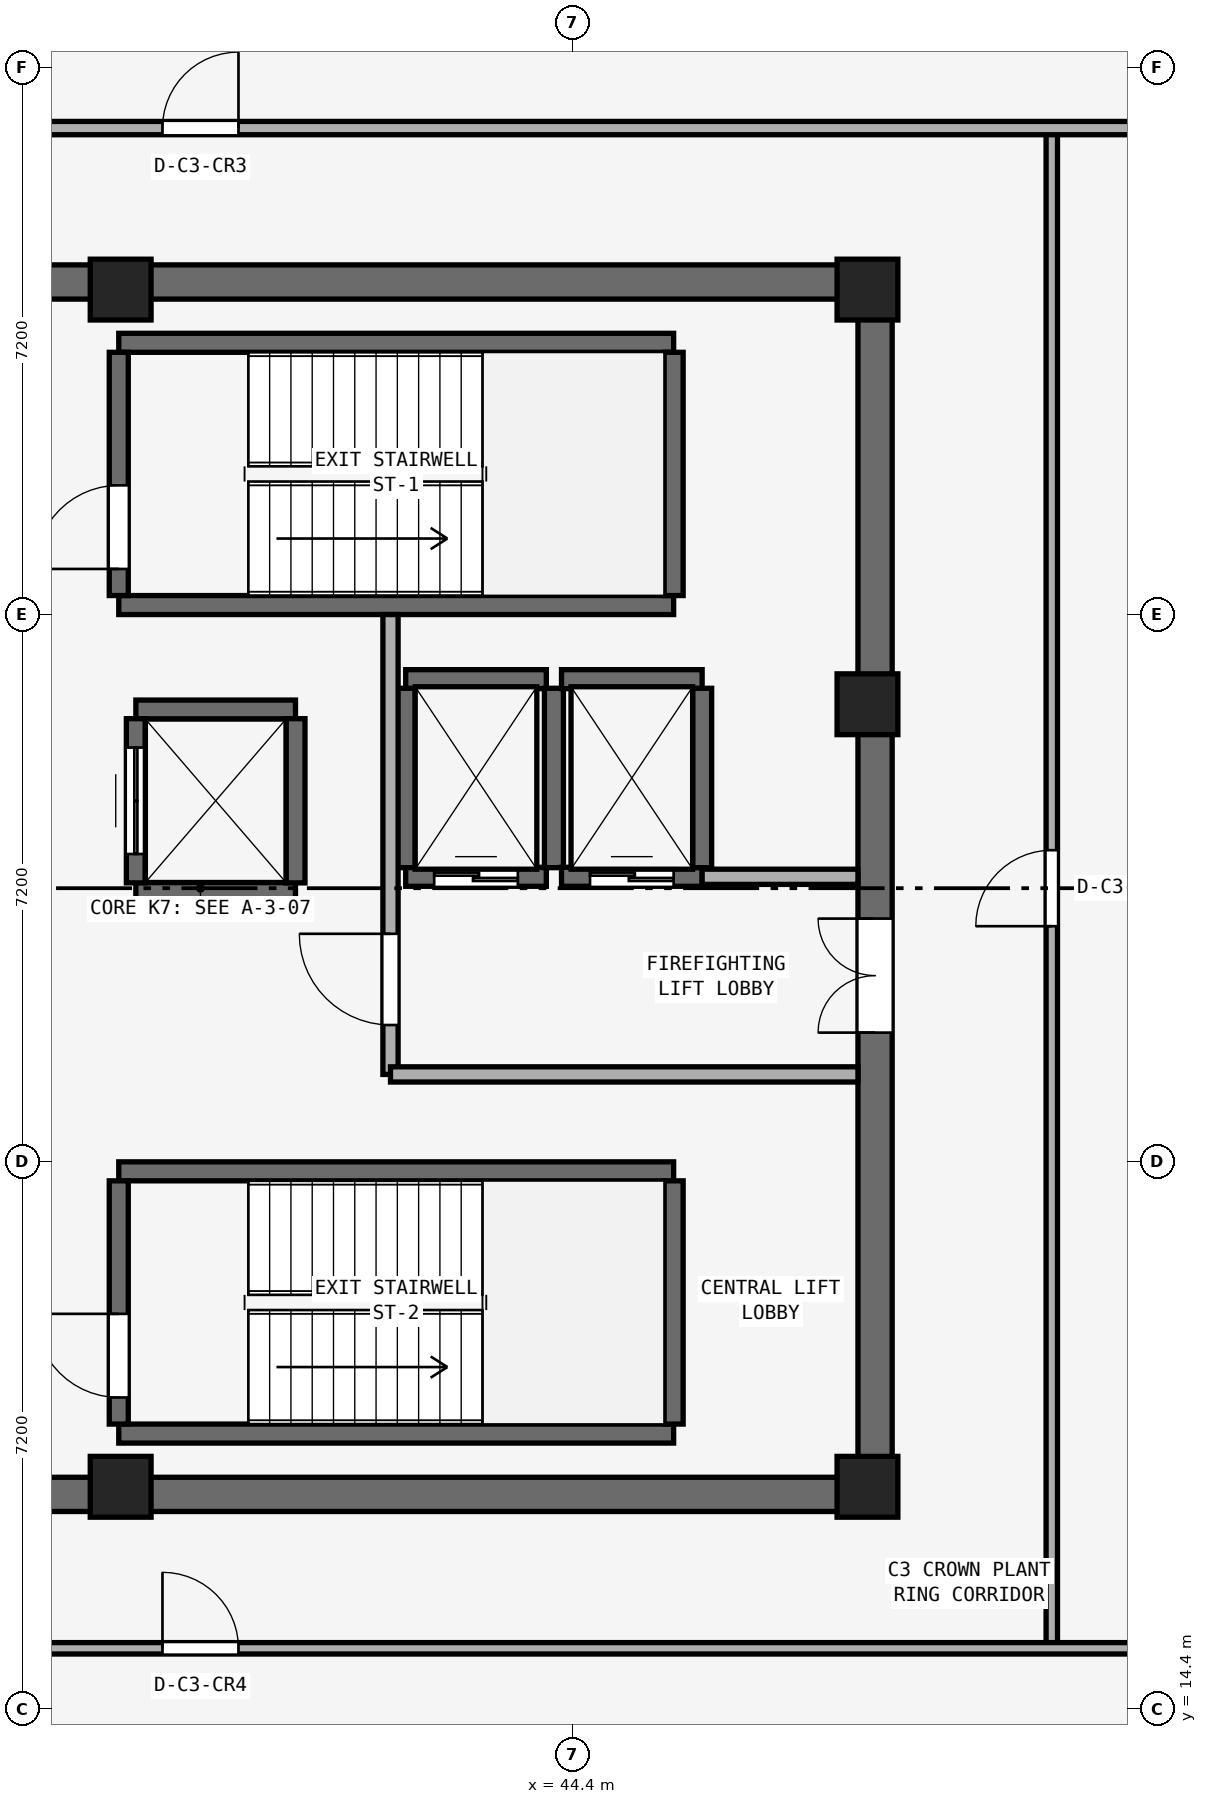
"""IFC4 building model, lengths in metres.
Left out: names, types, materials, properties, quantities, classifications, styles, units other than length and angle.
Written with IfcOpenShell. Run it as: python <this file> out.ifc"""

import sys

from ifc_helpers import new_model, si_unit, direction, frame, frame_2d, origin, origin_2d, place, context, subcontext, project, spatial, rectangle, extrude, element, fill, save


model = new_model("IFC4")
c1 = context("Model", 3, precision=1e-05, world=origin(), true_north=direction((0.0, 1.0)))
c2 = subcontext(c1, "Body", "Model", "MODEL_VIEW")
j1 = project(units=[si_unit("LENGTHUNIT", "METRE"), si_unit("PLANEANGLEUNIT", "RADIAN")], contexts=[c1])
p1 = place(None, origin())
s1 = spatial("IfcSite", under=j1, at=p1, CompositionType="ELEMENT")
p2 = place(p1, origin())
s2 = spatial("IfcBuilding", under=s1, at=p2, CompositionType="ELEMENT")
p3 = place(p2, frame((0.0, 0.0, 321.4)))
s3 = spatial("IfcBuildingStorey", under=s2, at=p3, CompositionType="ELEMENT", Elevation=321.4)
for number, where, z_axis, x_axis in (
    (1, (30.4, 17.225, 0.0), (0.0, 0.0, 1.0), (1.0, 0.0, 0.0)),
    (2, (30.4, 33.175, 0.0), (0.0, 0.0, 1.0), (1.0, 0.0, 0.0)),
):
    element("IfcWall", number, at=place(p3, frame(where, z_axis=z_axis, x_axis=x_axis)), inside=s3, PredefinedType="SHEAR", context=c2, shape_type="SweptSolid", body=[
        extrude(rectangle(XDim=18.2, YDim=0.45, at=frame_2d((9.1, 0.0))), origin(), (0.0, 0.0, 1.0), 3.72),
    ])
p4 = place(p3, frame((48.375, 17.45, 0.0), z_axis=(0.0, 0.0, 1.0), x_axis=(0.0, 1.0, 0.0)))
e3 = element("IfcWall", 3, at=p4, inside=s3, PredefinedType="SHEAR", context=c2, shape_type="SweptSolid", body=[
    extrude(rectangle(XDim=15.5, YDim=0.45, at=frame_2d((7.75, 0.0))), origin(), (0.0, 0.0, 1.0), 3.72),
])
p5 = place(p4, frame((5.85, 0.0, 0.0)))
e4 = element("IfcOpeningElement", 4, at=p5, cuts=e3, PredefinedType="OPENING", context=c2, shape_type="SweptSolid", body=[
    extrude(rectangle(XDim=1.5, YDim=2.15, at=frame_2d((0.75, 1.075))), frame((0.0, 0.235, 0.0), z_axis=(0.0, -1.0, 0.0), x_axis=(1.0, 0.0, 0.0)), (0.0, 0.0, 1.0), 0.47),
])
for number, where, z_axis, x_axis in (
    (5, (38.45, 17.325, 0.0), (0.0, 0.0, 1.0), (1.0, 0.0, 0.0)),
    (6, (48.275, 17.325, 0.0), (0.0, 0.0, 1.0), (1.0, 0.0, 0.0)),
    (7, (48.275, 27.62, 0.0), (0.0, 0.0, 1.0), (1.0, 0.0, 0.0)),
    (8, (48.275, 33.075, 0.0), (0.0, 0.0, 1.0), (1.0, 0.0, 0.0)),
    (9, (38.45, 33.075, 0.0), (0.0, 0.0, 1.0), (1.0, 0.0, 0.0)),
):
    element("IfcColumn", number, at=place(p3, frame(where, z_axis=z_axis, x_axis=x_axis)), inside=s3, PredefinedType="PILASTER", context=c2, shape_type="SweptSolid", body=[
        extrude(rectangle(XDim=0.8, YDim=0.8, at=origin_2d()), origin(), (0.0, 0.0, 1.0), 4.0),
    ])
for number, where, z_axis, x_axis in (
    (10, (38.425, 28.925, 0.0), (0.0, 0.0, 1.0), (1.0, 0.0, 0.0)),
    (11, (38.425, 32.375, 0.0), (0.0, 0.0, 1.0), (1.0, 0.0, 0.0)),
):
    element("IfcWall", number, at=place(p3, frame(where, z_axis=z_axis, x_axis=x_axis)), inside=s3, PredefinedType="SHEAR", context=c2, shape_type="SweptSolid", body=[
        extrude(rectangle(XDim=7.3, YDim=0.25, at=frame_2d((3.65, 0.0))), origin(), (0.0, 0.0, 1.0), 3.72),
    ])
p6 = place(p3, frame((38.425, 29.05, 0.0), z_axis=(0.0, 0.0, 1.0), x_axis=(0.0, 1.0, 0.0)))
e12 = element("IfcWall", 12, at=p6, inside=s3, PredefinedType="SHEAR", context=c2, shape_type="SweptSolid", body=[
    extrude(rectangle(XDim=3.2, YDim=0.25, at=frame_2d((1.6, 0.0))), origin(), (0.0, 0.0, 1.0), 3.72),
])
p7 = place(p6, frame((0.35, 0.0, 0.0)))
e13 = element("IfcOpeningElement", 13, at=p7, cuts=e12, PredefinedType="OPENING", context=c2, shape_type="SweptSolid", body=[
    extrude(rectangle(XDim=1.1, YDim=2.15, at=frame_2d((0.55, 1.075))), frame((0.0, 0.135, 0.0), z_axis=(0.0, -1.0, 0.0), x_axis=(1.0, 0.0, 0.0)), (0.0, 0.0, 1.0), 0.27),
])
p8 = place(p3, frame((45.725, 29.05, 0.0), z_axis=(0.0, 0.0, 1.0), x_axis=(0.0, 1.0, 0.0)))
e14 = element("IfcWall", 14, at=p8, inside=s3, PredefinedType="SHEAR", context=c2, shape_type="SweptSolid", body=[
    extrude(rectangle(XDim=3.2, YDim=0.25, at=frame_2d((1.6, 0.0))), origin(), (0.0, 0.0, 1.0), 3.72),
])
for number, where, z_axis, x_axis in (
    (15, (38.425, 18.025, 0.0), (0.0, 0.0, 1.0), (1.0, 0.0, 0.0)),
    (16, (38.425, 21.475, 0.0), (0.0, 0.0, 1.0), (1.0, 0.0, 0.0)),
):
    element("IfcWall", number, at=place(p3, frame(where, z_axis=z_axis, x_axis=x_axis)), inside=s3, PredefinedType="SHEAR", context=c2, shape_type="SweptSolid", body=[
        extrude(rectangle(XDim=7.3, YDim=0.25, at=frame_2d((3.65, 0.0))), origin(), (0.0, 0.0, 1.0), 3.72),
    ])
p9 = place(p3, frame((38.425, 18.15, 0.0), z_axis=(0.0, 0.0, 1.0), x_axis=(0.0, 1.0, 0.0)))
e17 = element("IfcWall", 17, at=p9, inside=s3, PredefinedType="SHEAR", context=c2, shape_type="SweptSolid", body=[
    extrude(rectangle(XDim=3.2, YDim=0.25, at=frame_2d((1.6, 0.0))), origin(), (0.0, 0.0, 1.0), 3.72),
])
p10 = place(p9, frame((0.35, 0.0, 0.0)))
e18 = element("IfcOpeningElement", 18, at=p10, cuts=e17, PredefinedType="OPENING", context=c2, shape_type="SweptSolid", body=[
    extrude(rectangle(XDim=1.1, YDim=2.15, at=frame_2d((0.55, 1.075))), frame((0.0, 0.135, 0.0), z_axis=(0.0, -1.0, 0.0), x_axis=(1.0, 0.0, 0.0)), (0.0, 0.0, 1.0), 0.27),
])
p11 = place(p3, frame((45.725, 18.15, 0.0), z_axis=(0.0, 0.0, 1.0), x_axis=(0.0, 1.0, 0.0)))
e19 = element("IfcWall", 19, at=p11, inside=s3, PredefinedType="SHEAR", context=c2, shape_type="SweptSolid", body=[
    extrude(rectangle(XDim=3.2, YDim=0.25, at=frame_2d((1.6, 0.0))), origin(), (0.0, 0.0, 1.0), 3.72),
])
p12 = place(p3, frame((42.2, 25.35, 0.0), z_axis=(0.0, 0.0, 1.0), x_axis=(1.0, 0.0, 0.0)))
e20 = element("IfcWall", 20, at=p12, inside=s3, PredefinedType="SHEAR", context=c2, shape_type="SweptSolid", body=[
    extrude(rectangle(XDim=1.85, YDim=0.25, at=frame_2d((0.925, 0.0))), origin(), (0.0, 0.0, 1.0), 3.72),
])
p13 = place(p12, frame((0.375, 0.0, 0.0)))
e21 = element("IfcOpeningElement", 21, at=p13, cuts=e20, PredefinedType="OPENING", context=c2, shape_type="SweptSolid", body=[
    extrude(rectangle(XDim=1.1, YDim=2.15, at=frame_2d((0.55, 1.075))), frame((0.0, 0.135, 0.0), z_axis=(0.0, -1.0, 0.0), x_axis=(1.0, 0.0, 0.0)), (0.0, 0.0, 1.0), 0.27),
])
p14 = place(p3, frame((42.2, 27.95, 0.0), z_axis=(0.0, 0.0, 1.0), x_axis=(1.0, 0.0, 0.0)))
e22 = element("IfcWall", 22, at=p14, inside=s3, PredefinedType="SHEAR", context=c2, shape_type="SweptSolid", body=[
    extrude(rectangle(XDim=1.85, YDim=0.25, at=frame_2d((0.925, 0.0))), origin(), (0.0, 0.0, 1.0), 3.72),
])
for number, where, z_axis, x_axis in (
    (23, (42.2, 25.47, 0.0), (0.0, 0.0, 1.0), (0.0, 1.0, 0.0)),
    (24, (44.15, 25.47, 0.0), (0.0, 0.0, 1.0), (0.0, 1.0, 0.0)),
):
    element("IfcWall", number, at=place(p3, frame(where, z_axis=z_axis, x_axis=x_axis)), inside=s3, PredefinedType="SHEAR", context=c2, shape_type="SweptSolid", body=[
        extrude(rectangle(XDim=2.36, YDim=0.25, at=frame_2d((1.18, 0.0))), origin(), (0.0, 0.0, 1.0), 3.72),
    ])
p15 = place(p3, frame((44.25, 25.35, 0.0), z_axis=(0.0, 0.0, 1.0), x_axis=(1.0, 0.0, 0.0)))
e25 = element("IfcWall", 25, at=p15, inside=s3, PredefinedType="SHEAR", context=c2, shape_type="SweptSolid", body=[
    extrude(rectangle(XDim=1.85, YDim=0.25, at=frame_2d((0.925, 0.0))), origin(), (0.0, 0.0, 1.0), 3.72),
])
p16 = place(p15, frame((0.375, 0.0, 0.0)))
e26 = element("IfcOpeningElement", 26, at=p16, cuts=e25, PredefinedType="OPENING", context=c2, shape_type="SweptSolid", body=[
    extrude(rectangle(XDim=1.1, YDim=2.15, at=frame_2d((0.55, 1.075))), frame((0.0, 0.135, 0.0), z_axis=(0.0, -1.0, 0.0), x_axis=(1.0, 0.0, 0.0)), (0.0, 0.0, 1.0), 0.27),
])
p17 = place(p3, frame((44.25, 27.95, 0.0), z_axis=(0.0, 0.0, 1.0), x_axis=(1.0, 0.0, 0.0)))
e27 = element("IfcWall", 27, at=p17, inside=s3, PredefinedType="SHEAR", context=c2, shape_type="SweptSolid", body=[
    extrude(rectangle(XDim=1.85, YDim=0.25, at=frame_2d((0.925, 0.0))), origin(), (0.0, 0.0, 1.0), 3.72),
])
p18 = place(p3, frame((46.1, 25.47, 0.0), z_axis=(0.0, 0.0, 1.0), x_axis=(0.0, 1.0, 0.0)))
e28 = element("IfcWall", 28, at=p18, inside=s3, PredefinedType="SHEAR", context=c2, shape_type="SweptSolid", body=[
    extrude(rectangle(XDim=2.36, YDim=0.25, at=frame_2d((1.18, 0.0))), origin(), (0.0, 0.0, 1.0), 3.72),
])
for number, where, z_axis, x_axis in (
    (29, (38.65, 25.15, 0.0), (0.0, 0.0, 1.0), (1.0, 0.0, 0.0)),
    (30, (38.65, 27.55, 0.0), (0.0, 0.0, 1.0), (1.0, 0.0, 0.0)),
):
    element("IfcWall", number, at=place(p3, frame(where, z_axis=z_axis, x_axis=x_axis)), inside=s3, PredefinedType="SHEAR", context=c2, shape_type="SweptSolid", body=[
        extrude(rectangle(XDim=2.1, YDim=0.25, at=frame_2d((1.05, 0.0))), origin(), (0.0, 0.0, 1.0), 3.72),
    ])
p19 = place(p3, frame((38.65, 25.27, 0.0), z_axis=(0.0, 0.0, 1.0), x_axis=(0.0, 1.0, 0.0)))
e31 = element("IfcWall", 31, at=p19, inside=s3, PredefinedType="SHEAR", context=c2, shape_type="SweptSolid", body=[
    extrude(rectangle(XDim=2.16, YDim=0.25, at=frame_2d((1.08, 0.0))), origin(), (0.0, 0.0, 1.0), 3.72),
])
p20 = place(p19, frame((0.38, 0.0, 0.0)))
e32 = element("IfcOpeningElement", 32, at=p20, cuts=e31, PredefinedType="OPENING", context=c2, shape_type="SweptSolid", body=[
    extrude(rectangle(XDim=1.4, YDim=2.2, at=frame_2d((0.7, 1.1))), frame((0.0, 0.135, 0.0), z_axis=(0.0, -1.0, 0.0), x_axis=(1.0, 0.0, 0.0)), (0.0, 0.0, 1.0), 0.27),
])
p21 = place(p3, frame((40.75, 25.27, 0.0), z_axis=(0.0, 0.0, 1.0), x_axis=(0.0, 1.0, 0.0)))
e33 = element("IfcWall", 33, at=p21, inside=s3, PredefinedType="SHEAR", context=c2, shape_type="SweptSolid", body=[
    extrude(rectangle(XDim=2.16, YDim=0.25, at=frame_2d((1.08, 0.0))), origin(), (0.0, 0.0, 1.0), 3.72),
])
p22 = place(p3, frame((42.0, 22.75, 0.0), z_axis=(0.0, 0.0, 1.0), x_axis=(0.0, 1.0, 0.0)))
e34 = element("IfcWall", 34, at=p22, inside=s3, PredefinedType="SOLIDWALL", context=c2, shape_type="SweptSolid", body=[
    extrude(rectangle(XDim=6.05, YDim=0.2, at=frame_2d((3.025, 0.0))), origin(), (0.0, 0.0, 1.0), 3.72),
])
p23 = place(p22, frame((0.65, 0.0, 0.0)))
e35 = element("IfcOpeningElement", 35, at=p23, cuts=e34, PredefinedType="OPENING", context=c2, shape_type="SweptSolid", body=[
    extrude(rectangle(XDim=1.2, YDim=2.15, at=frame_2d((0.6, 1.075))), frame((0.0, 0.11, 0.0), z_axis=(0.0, -1.0, 0.0), x_axis=(1.0, 0.0, 0.0)), (0.0, 0.0, 1.0), 0.22),
])
p24 = place(p3, frame((42.0, 22.75, 0.0), z_axis=(0.0, 0.0, 1.0), x_axis=(1.0, 0.0, 0.0)))
e36 = element("IfcWall", 36, at=p24, inside=s3, PredefinedType="SOLIDWALL", context=c2, shape_type="SweptSolid", body=[
    extrude(rectangle(XDim=6.15, YDim=0.2, at=frame_2d((3.075, 0.0))), origin(), (0.0, 0.0, 1.0), 3.72),
])
p25 = place(p3, frame((46.1, 25.35, 0.0), z_axis=(0.0, 0.0, 1.0), x_axis=(1.0, 0.0, 0.0)))
e37 = element("IfcWall", 37, at=p25, inside=s3, PredefinedType="SOLIDWALL", context=c2, shape_type="SweptSolid", body=[
    extrude(rectangle(XDim=2.05, YDim=0.2, at=frame_2d((1.025, 0.0))), origin(), (0.0, 0.0, 1.0), 3.72),
])
p26 = place(p3, frame((50.7, 15.2, 0.0), z_axis=(0.0, 0.0, 1.0), x_axis=(0.0, 1.0, 0.0)))
e38 = element("IfcWall", 38, at=p26, inside=s3, PredefinedType="PARTITIONING", context=c2, shape_type="SweptSolid", body=[
    extrude(rectangle(XDim=20.0, YDim=0.15, at=frame_2d((10.0, 0.0))), origin(), (0.0, 0.0, 1.0), 3.72),
])
p27 = place(p26, frame((9.5, 0.0, 0.0)))
e39 = element("IfcOpeningElement", 39, at=p27, cuts=e38, PredefinedType="OPENING", context=c2, shape_type="SweptSolid", body=[
    extrude(rectangle(XDim=1.0, YDim=2.12, at=frame_2d((0.5, 1.06))), frame((0.0, 0.085, 0.0), z_axis=(0.0, -1.0, 0.0), x_axis=(1.0, 0.0, 0.0)), (0.0, 0.0, 1.0), 0.17),
])
p28 = place(p3, frame((24.464, 15.2, 0.0), z_axis=(0.0, 0.0, 1.0), x_axis=(1.0, 0.0, 0.0)))
e40 = element("IfcWall", 40, at=p28, inside=s3, PredefinedType="PARTITIONING", context=c2, shape_type="SweptSolid", body=[
    extrude(rectangle(XDim=30.765, YDim=0.15, at=frame_2d((15.383, 0.0))), origin(), (0.0, 0.0, 1.0), 3.72),
])
p29 = place(p28, frame((14.536, 0.0, 0.0)))
e41 = element("IfcOpeningElement", 41, at=p29, cuts=e40, PredefinedType="OPENING", context=c2, shape_type="SweptSolid", body=[
    extrude(rectangle(XDim=1.0, YDim=2.12, at=frame_2d((0.5, 1.06))), frame((0.0, 0.085, 0.0), z_axis=(0.0, -1.0, 0.0), x_axis=(1.0, 0.0, 0.0)), (0.0, 0.0, 1.0), 0.17),
])
p30 = place(p3, frame((25.074, 35.2, 0.0), z_axis=(0.0, 0.0, 1.0), x_axis=(1.0, 0.0, 0.0)))
e42 = element("IfcWall", 42, at=p30, inside=s3, PredefinedType="PARTITIONING", context=c2, shape_type="SweptSolid", body=[
    extrude(rectangle(XDim=31.228, YDim=0.175, at=frame_2d((15.614, 0.0))), origin(), (0.0, 0.0, 1.0), 3.72),
])
p31 = place(p30, frame((13.926, 0.0, 0.0)))
e43 = element("IfcOpeningElement", 43, at=p31, cuts=e42, PredefinedType="OPENING", context=c2, shape_type="SweptSolid", body=[
    extrude(rectangle(XDim=1.0, YDim=2.12, at=frame_2d((0.5, 1.06))), frame((0.0, 0.097, 0.0), z_axis=(0.0, -1.0, 0.0), x_axis=(1.0, 0.0, 0.0)), (0.0, 0.0, 1.0), 0.195),
])
p32 = place(p3, frame((47.371, 8.558, 0.0), z_axis=(0.0, 0.0, 1.0), x_axis=(0.760637685394, 0.649176641261, 0.0)))
e44 = element("IfcWall", 44, at=p32, inside=s3, PredefinedType="STANDARD", context=c2, shape_type="SweptSolid", body=[
    extrude(rectangle(XDim=11.852, YDim=0.28, at=frame_2d((5.926, 0.0))), origin(), (0.0, 0.0, 1.0), 3.72),
])
p33 = place(p32, frame((1.509, 0.0, 0.9)))
e45 = element("IfcOpeningElement", 45, at=p33, cuts=e44, PredefinedType="OPENING", context=c2, shape_type="SweptSolid", body=[
    extrude(rectangle(XDim=1.6, YDim=1.45, at=frame_2d((0.8, 0.725))), frame((0.0, 0.15, 0.0), z_axis=(0.0, -1.0, 0.0), x_axis=(1.0, 0.0, 0.0)), (0.0, 0.0, 1.0), 0.3),
])
p34 = place(p32, frame((5.126, 0.0, 0.9)))
e46 = element("IfcOpeningElement", 46, at=p34, cuts=e44, PredefinedType="OPENING", context=c2, shape_type="SweptSolid", body=[
    extrude(rectangle(XDim=1.6, YDim=1.45, at=frame_2d((0.8, 0.725))), frame((0.0, 0.15, 0.0), z_axis=(0.0, -1.0, 0.0), x_axis=(1.0, 0.0, 0.0)), (0.0, 0.0, 1.0), 0.3),
])
p35 = place(p3, frame((56.25, 35.201, 0.0), z_axis=(0.0, 0.0, 1.0), x_axis=(-0.796694895732, 0.60438170316, 0.0)))
e47 = element("IfcWall", 47, at=p35, inside=s3, PredefinedType="STANDARD", context=c2, shape_type="SweptSolid", body=[
    extrude(rectangle(XDim=11.183, YDim=0.28, at=frame_2d((5.591, 0.0))), origin(), (0.0, 0.0, 1.0), 3.72),
])
p36 = place(p35, frame((1.397, 0.0, 0.9)))
e48 = element("IfcOpeningElement", 48, at=p36, cuts=e47, PredefinedType="OPENING", context=c2, shape_type="SweptSolid", body=[
    extrude(rectangle(XDim=1.6, YDim=1.45, at=frame_2d((0.8, 0.725))), frame((0.0, 0.15, 0.0), z_axis=(0.0, -1.0, 0.0), x_axis=(1.0, 0.0, 0.0)), (0.0, 0.0, 1.0), 0.3),
])
p37 = place(p35, frame((4.792, 0.0, 0.9)))
e49 = element("IfcOpeningElement", 49, at=p37, cuts=e47, PredefinedType="OPENING", context=c2, shape_type="SweptSolid", body=[
    extrude(rectangle(XDim=1.6, YDim=1.45, at=frame_2d((0.8, 0.725))), frame((0.0, 0.15, 0.0), z_axis=(0.0, -1.0, 0.0), x_axis=(1.0, 0.0, 0.0)), (0.0, 0.0, 1.0), 0.3),
])
p38 = place(p35, frame((8.186, 0.0, 0.9)))
e50 = element("IfcOpeningElement", 50, at=p38, cuts=e47, PredefinedType="OPENING", context=c2, shape_type="SweptSolid", body=[
    extrude(rectangle(XDim=1.6, YDim=1.45, at=frame_2d((0.8, 0.725))), frame((0.0, 0.15, 0.0), z_axis=(0.0, -1.0, 0.0), x_axis=(1.0, 0.0, 0.0)), (0.0, 0.0, 1.0), 0.3),
])
p39 = place(p7, origin())
e51 = element("IfcDoor", 51, at=p39, inside=s3, OperationType="SINGLE_SWING_LEFT", PredefinedType="DOOR", context=c2, shape_type="SweptSolid", body=[
    extrude(rectangle(XDim=1.1, YDim=2.15, at=frame_2d((0.55, 1.075))), frame((0.0, 0.025, 0.0), z_axis=(0.0, -1.0, 0.0), x_axis=(1.0, 0.0, 0.0)), (0.0, 0.0, 1.0), 0.05),
])
fill(e13, e51)
p40 = place(p10, origin())
e52 = element("IfcDoor", 52, at=p40, inside=s3, OperationType="SINGLE_SWING_RIGHT", PredefinedType="DOOR", context=c2, shape_type="SweptSolid", body=[
    extrude(rectangle(XDim=1.1, YDim=2.15, at=frame_2d((0.55, 1.075))), frame((0.0, 0.025, 0.0), z_axis=(0.0, -1.0, 0.0), x_axis=(1.0, 0.0, 0.0)), (0.0, 0.0, 1.0), 0.05),
])
fill(e18, e52)
p41 = place(p13, origin())
e53 = element("IfcDoor", 53, at=p41, inside=s3, OperationType="DOUBLE_DOOR_SLIDING", PredefinedType="DOOR", context=c2, shape_type="SweptSolid", body=[
    extrude(rectangle(XDim=1.1, YDim=2.15, at=frame_2d((0.55, 1.075))), frame((0.0, 0.025, 0.0), z_axis=(0.0, -1.0, 0.0), x_axis=(1.0, 0.0, 0.0)), (0.0, 0.0, 1.0), 0.05),
])
fill(e21, e53)
p42 = place(p16, origin())
e54 = element("IfcDoor", 54, at=p42, inside=s3, OperationType="DOUBLE_DOOR_SLIDING", PredefinedType="DOOR", context=c2, shape_type="SweptSolid", body=[
    extrude(rectangle(XDim=1.1, YDim=2.15, at=frame_2d((0.55, 1.075))), frame((0.0, 0.025, 0.0), z_axis=(0.0, -1.0, 0.0), x_axis=(1.0, 0.0, 0.0)), (0.0, 0.0, 1.0), 0.05),
])
fill(e26, e54)
p43 = place(p20, origin())
e55 = element("IfcDoor", 55, at=p43, inside=s3, OperationType="DOUBLE_DOOR_SLIDING", PredefinedType="DOOR", context=c2, shape_type="SweptSolid", body=[
    extrude(rectangle(XDim=1.4, YDim=2.2, at=frame_2d((0.7, 1.1))), frame((0.0, 0.025, 0.0), z_axis=(0.0, -1.0, 0.0), x_axis=(1.0, 0.0, 0.0)), (0.0, 0.0, 1.0), 0.05),
])
fill(e32, e55)
p44 = place(p23, origin())
e56 = element("IfcDoor", 56, at=p44, inside=s3, OperationType="SINGLE_SWING_RIGHT", PredefinedType="DOOR", context=c2, shape_type="SweptSolid", body=[
    extrude(rectangle(XDim=1.2, YDim=2.15, at=frame_2d((0.6, 1.075))), frame((0.0, 0.025, 0.0), z_axis=(0.0, -1.0, 0.0), x_axis=(1.0, 0.0, 0.0)), (0.0, 0.0, 1.0), 0.05),
])
fill(e35, e56)
p45 = place(p5, origin())
e57 = element("IfcDoor", 57, at=p45, inside=s3, OperationType="DOUBLE_DOOR_SINGLE_SWING", PredefinedType="DOOR", context=c2, shape_type="SweptSolid", body=[
    extrude(rectangle(XDim=1.5, YDim=2.15, at=frame_2d((0.75, 1.075))), frame((0.0, 0.025, 0.0), z_axis=(0.0, -1.0, 0.0), x_axis=(1.0, 0.0, 0.0)), (0.0, 0.0, 1.0), 0.05),
])
fill(e4, e57)
p46 = place(p27, origin())
e58 = element("IfcDoor", 58, at=p46, inside=s3, OperationType="SINGLE_SWING_LEFT", PredefinedType="DOOR", context=c2, shape_type="SweptSolid", body=[
    extrude(rectangle(XDim=1.0, YDim=2.12, at=frame_2d((0.5, 1.06))), frame((0.0, 0.025, 0.0), z_axis=(0.0, -1.0, 0.0), x_axis=(1.0, 0.0, 0.0)), (0.0, 0.0, 1.0), 0.05),
])
fill(e39, e58)
p47 = place(p31, origin())
e59 = element("IfcDoor", 59, at=p47, inside=s3, OperationType="SINGLE_SWING_RIGHT", PredefinedType="DOOR", context=c2, shape_type="SweptSolid", body=[
    extrude(rectangle(XDim=1.0, YDim=2.12, at=frame_2d((0.5, 1.06))), frame((0.0, 0.025, 0.0), z_axis=(0.0, -1.0, 0.0), x_axis=(1.0, 0.0, 0.0)), (0.0, 0.0, 1.0), 0.05),
])
fill(e43, e59)
p48 = place(p29, origin())
e60 = element("IfcDoor", 60, at=p48, inside=s3, OperationType="SINGLE_SWING_LEFT", PredefinedType="DOOR", context=c2, shape_type="SweptSolid", body=[
    extrude(rectangle(XDim=1.0, YDim=2.12, at=frame_2d((0.5, 1.06))), frame((0.0, 0.025, 0.0), z_axis=(0.0, -1.0, 0.0), x_axis=(1.0, 0.0, 0.0)), (0.0, 0.0, 1.0), 0.05),
])
fill(e41, e60)
save(model, sys.argv[1])
